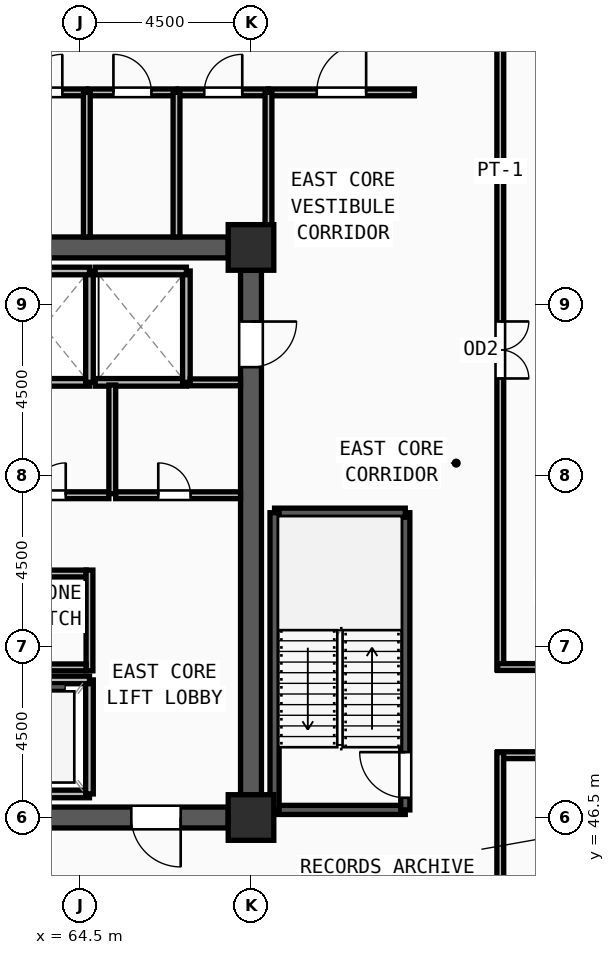
"""IFC4 building model, lengths in metres.
Left out: names, types, materials, properties, quantities, classifications, styles, units other than length and angle.
Written with IfcOpenShell. Run it as: python <this file> out.ifc"""

import sys

from ifc_helpers import new_model, si_unit, direction, frame, frame_2d, origin, origin_2d, place, context, subcontext, project, spatial, rectangle, extrude, source, transform, mapped, element, fill, save


model = new_model("IFC4")
c1 = context("Model", 3, precision=1e-05, world=origin(), true_north=direction((0.0, 1.0)))
c2 = subcontext(c1, "Body", "Model", "MODEL_VIEW")
j1 = project(units=[si_unit("LENGTHUNIT", "METRE"), si_unit("PLANEANGLEUNIT", "RADIAN")], contexts=[c1])
p1 = place(None, origin())
s1 = spatial("IfcSite", under=j1, at=p1, CompositionType="ELEMENT")
p2 = place(p1, origin())
s2 = spatial("IfcBuilding", under=s1, at=p2, CompositionType="ELEMENT")
p3 = place(p2, frame((0.0, 0.0, 328.5)))
s3 = spatial("IfcBuildingStorey", under=s2, at=p3, CompositionType="ELEMENT", Elevation=328.5)
m1 = source(origin(), c2, "Body", "SweptSolid", [
    extrude(rectangle(XDim=1.2, YDim=1.2, at=origin_2d()), origin(), (0.0, 0.0, 1.0), 3.75),
])
for number, where, z_axis, x_axis in (
    (1, (69.0, 46.5, 0.0), (0.0, 0.0, 1.0), (1.0, 0.0, 0.0)),
    (2, (69.0, 61.5, 0.0), (0.0, 0.0, 1.0), (1.0, 0.0, 0.0)),
):
    element("IfcColumn", number, at=place(p3, frame(where, z_axis=z_axis, x_axis=x_axis)), inside=s3, PredefinedType="COLUMN", context=c2, shape_type="MappedRepresentation", body=[
        mapped(m1, transform((0.0, 0.0, 0.0), x_axis=(1.0, 0.0, 0.0), y_axis=(0.0, 1.0, 0.0), z_axis=(0.0, 0.0, 1.0), scale=1.0)),
    ])
p4 = place(p3, frame((60.6, 61.5, 0.0), z_axis=(0.0, 0.0, 1.0), x_axis=(1.0, 0.0, 0.0)))
e3 = element("IfcWall", 3, at=p4, inside=s3, PredefinedType="SHEAR", context=c2, shape_type="SweptSolid", body=[
    extrude(rectangle(XDim=7.8, YDim=0.55, at=frame_2d((3.9, 0.0))), origin(), (0.0, 0.0, 1.0), 3.57),
])
p5 = place(p3, frame((69.0, 60.9, 0.0), z_axis=(0.0, 0.0, 1.0), x_axis=(0.0, -1.0, 0.0)))
e4 = element("IfcWall", 4, at=p5, inside=s3, PredefinedType="SHEAR", context=c2, shape_type="SweptSolid", body=[
    extrude(rectangle(XDim=13.8, YDim=0.55, at=frame_2d((6.9, 0.0))), origin(), (0.0, 0.0, 1.0), 3.57),
])
m2 = source(origin(), c2, "Body", "SweptSolid", [
    extrude(rectangle(XDim=1.2, YDim=2.2, at=frame_2d((0.6, 1.1))), frame((0.0, 0.285, 0.0), z_axis=(0.0, -1.0, 0.0), x_axis=(1.0, 0.0, 0.0)), (0.0, 0.0, 1.0), 0.57),
])
p6 = place(p5, frame((1.35, 0.0, 0.0)))
e5 = element("IfcOpeningElement", 5, at=p6, cuts=e4, PredefinedType="OPENING", context=c2, shape_type="MappedRepresentation", body=[
    mapped(m2, transform((0.0, 0.0, 0.0), x_axis=(1.0, 0.0, 0.0), y_axis=(0.0, 1.0, 0.0), z_axis=(0.0, 0.0, 1.0), scale=1.0)),
])
p7 = place(p3, frame((68.4, 46.5, 0.0), z_axis=(0.0, 0.0, 1.0), x_axis=(-1.0, 0.0, 0.0)))
e6 = element("IfcWall", 6, at=p7, inside=s3, PredefinedType="SHEAR", context=c2, shape_type="SweptSolid", body=[
    extrude(rectangle(XDim=7.8, YDim=0.55, at=frame_2d((3.9, 0.0))), origin(), (0.0, 0.0, 1.0), 3.57),
])
m3 = source(origin(), c2, "Body", "SweptSolid", [
    extrude(rectangle(XDim=1.3, YDim=2.2, at=frame_2d((0.65, 1.1))), frame((0.0, 0.285, 0.0), z_axis=(0.0, -1.0, 0.0), x_axis=(1.0, 0.0, 0.0)), (0.0, 0.0, 1.0), 0.57),
])
p8 = place(p7, frame((1.25, 0.0, 0.0)))
e7 = element("IfcOpeningElement", 7, at=p8, cuts=e6, PredefinedType="OPENING", context=c2, shape_type="MappedRepresentation", body=[
    mapped(m3, transform((0.0, 0.0, 0.0), x_axis=(1.0, 0.0, 0.0), y_axis=(0.0, 1.0, 0.0), z_axis=(0.0, 0.0, 1.0), scale=1.0)),
])
p9 = place(p3, frame((69.62, 46.7, 0.0), z_axis=(0.0, 0.0, 1.0), x_axis=(1.0, 0.0, 0.0)))
e8 = element("IfcWall", 8, at=p9, inside=s3, PredefinedType="SOLIDWALL", context=c2, shape_type="SweptSolid", body=[
    extrude(rectangle(XDim=3.44, YDim=0.24, at=frame_2d((1.72, 0.0))), origin(), (0.0, 0.0, 1.0), 3.57),
])
p10 = place(p3, frame((73.06, 46.7, 0.0), z_axis=(0.0, 0.0, 1.0), x_axis=(0.0, 1.0, 0.0)))
e9 = element("IfcWall", 9, at=p10, inside=s3, PredefinedType="SOLIDWALL", context=c2, shape_type="SweptSolid", body=[
    extrude(rectangle(XDim=7.82, YDim=0.24, at=frame_2d((3.91, 0.0))), origin(), (0.0, 0.0, 1.0), 3.57),
])
m4 = source(origin(), c2, "Body", "SweptSolid", [
    extrude(rectangle(XDim=1.2, YDim=2.2, at=frame_2d((0.6, 1.1))), frame((0.0, 0.13, 0.0), z_axis=(0.0, -1.0, 0.0), x_axis=(1.0, 0.0, 0.0)), (0.0, 0.0, 1.0), 0.26),
])
p11 = place(p10, frame((0.32, 0.0, 0.0)))
e10 = element("IfcOpeningElement", 10, at=p11, cuts=e9, PredefinedType="OPENING", context=c2, shape_type="MappedRepresentation", body=[
    mapped(m4, transform((0.0, 0.0, 0.0), x_axis=(1.0, 0.0, 0.0), y_axis=(0.0, 1.0, 0.0), z_axis=(0.0, 0.0, 1.0), scale=1.0)),
])
p12 = place(p3, frame((73.06, 54.52, 0.0), z_axis=(0.0, 0.0, 1.0), x_axis=(-1.0, 0.0, 0.0)))
e11 = element("IfcWall", 11, at=p12, inside=s3, PredefinedType="SOLIDWALL", context=c2, shape_type="SweptSolid", body=[
    extrude(rectangle(XDim=3.44, YDim=0.24, at=frame_2d((1.72, 0.0))), origin(), (0.0, 0.0, 1.0), 3.57),
])
p13 = place(p3, frame((69.62, 54.52, 0.0), z_axis=(0.0, 0.0, 1.0), x_axis=(0.0, -1.0, 0.0)))
e12 = element("IfcWall", 12, at=p13, inside=s3, PredefinedType="SOLIDWALL", context=c2, shape_type="SweptSolid", body=[
    extrude(rectangle(XDim=7.82, YDim=0.24, at=frame_2d((3.91, 0.0))), origin(), (0.0, 0.0, 1.0), 3.57),
])
p14 = place(p3, frame((62.35, 47.12, 0.0), z_axis=(0.0, 0.0, 1.0), x_axis=(1.0, 0.0, 0.0)))
e13 = element("IfcWall", 13, at=p14, inside=s3, PredefinedType="SOLIDWALL", context=c2, shape_type="SweptSolid", body=[
    extrude(rectangle(XDim=2.4, YDim=0.2, at=frame_2d((1.2, 0.0))), origin(), (0.0, 0.0, 1.0), 3.57),
])
p15 = place(p3, frame((64.75, 47.12, 0.0), z_axis=(0.0, 0.0, 1.0), x_axis=(0.0, 1.0, 0.0)))
e14 = element("IfcWall", 14, at=p15, inside=s3, PredefinedType="SOLIDWALL", context=c2, shape_type="SweptSolid", body=[
    extrude(rectangle(XDim=3.0, YDim=0.2, at=frame_2d((1.5, 0.0))), origin(), (0.0, 0.0, 1.0), 3.57),
])
for number, where, z_axis, x_axis in (
    (15, (64.75, 50.12, 0.0), (0.0, 0.0, 1.0), (-1.0, 0.0, 0.0)),
    (16, (62.35, 57.95, 0.0), (0.0, 0.0, 1.0), (1.0, 0.0, 0.0)),
):
    element("IfcWall", number, at=place(p3, frame(where, z_axis=z_axis, x_axis=x_axis)), inside=s3, PredefinedType="SOLIDWALL", context=c2, shape_type="SweptSolid", body=[
        extrude(rectangle(XDim=2.4, YDim=0.2, at=frame_2d((1.2, 0.0))), origin(), (0.0, 0.0, 1.0), 3.57),
    ])
p16 = place(p3, frame((64.75, 57.95, 0.0), z_axis=(0.0, 0.0, 1.0), x_axis=(0.0, 1.0, 0.0)))
e17 = element("IfcWall", 17, at=p16, inside=s3, PredefinedType="SOLIDWALL", context=c2, shape_type="SweptSolid", body=[
    extrude(rectangle(XDim=2.93, YDim=0.2, at=frame_2d((1.465, 0.0))), origin(), (0.0, 0.0, 1.0), 3.57),
])
p17 = place(p3, frame((64.75, 60.88, 0.0), z_axis=(0.0, 0.0, 1.0), x_axis=(-1.0, 0.0, 0.0)))
e18 = element("IfcWall", 18, at=p17, inside=s3, PredefinedType="SOLIDWALL", context=c2, shape_type="SweptSolid", body=[
    extrude(rectangle(XDim=2.4, YDim=0.2, at=frame_2d((1.2, 0.0))), origin(), (0.0, 0.0, 1.0), 3.57),
])
p18 = place(p3, frame((64.9, 57.95, 0.0), z_axis=(0.0, 0.0, 1.0), x_axis=(1.0, 0.0, 0.0)))
e19 = element("IfcWall", 19, at=p18, inside=s3, PredefinedType="SOLIDWALL", context=c2, shape_type="SweptSolid", body=[
    extrude(rectangle(XDim=2.4, YDim=0.2, at=frame_2d((1.2, 0.0))), origin(), (0.0, 0.0, 1.0), 3.57),
])
p19 = place(p3, frame((67.3, 57.95, 0.0), z_axis=(0.0, 0.0, 1.0), x_axis=(0.0, 1.0, 0.0)))
e20 = element("IfcWall", 20, at=p19, inside=s3, PredefinedType="SOLIDWALL", context=c2, shape_type="SweptSolid", body=[
    extrude(rectangle(XDim=2.93, YDim=0.2, at=frame_2d((1.465, 0.0))), origin(), (0.0, 0.0, 1.0), 3.57),
])
p20 = place(p3, frame((67.3, 60.88, 0.0), z_axis=(0.0, 0.0, 1.0), x_axis=(-1.0, 0.0, 0.0)))
e21 = element("IfcWall", 21, at=p20, inside=s3, PredefinedType="SOLIDWALL", context=c2, shape_type="SweptSolid", body=[
    extrude(rectangle(XDim=2.4, YDim=0.2, at=frame_2d((1.2, 0.0))), origin(), (0.0, 0.0, 1.0), 3.57),
])
p21 = place(p3, frame((60.0, 52.92, 0.0), z_axis=(0.0, 0.0, 1.0), x_axis=(1.0, 0.0, 0.0)))
e22 = element("IfcWall", 22, at=p21, inside=s3, PredefinedType="PARTITIONING", context=c2, shape_type="SweptSolid", body=[
    extrude(rectangle(XDim=4.66, YDim=0.18, at=frame_2d((2.33, 0.0))), origin(), (0.0, 0.0, 1.0), 3.57),
])
m5 = source(origin(), c2, "Body", "SweptSolid", [
    extrude(rectangle(XDim=0.85, YDim=2.1, at=frame_2d((0.425, 1.05))), frame((0.0, 0.1, 0.0), z_axis=(0.0, -1.0, 0.0), x_axis=(1.0, 0.0, 0.0)), (0.0, 0.0, 1.0), 0.2),
])
p22 = place(p21, frame((1.975, 0.0, 0.0)))
e23 = element("IfcOpeningElement", 23, at=p22, cuts=e22, PredefinedType="OPENING", context=c2, shape_type="MappedRepresentation", body=[
    mapped(m5, transform((0.0, 0.0, 0.0), x_axis=(1.0, 0.0, 0.0), y_axis=(0.0, 1.0, 0.0), z_axis=(0.0, 0.0, 1.0), scale=1.0)),
])
p23 = place(p3, frame((62.1, 54.98, 0.0), z_axis=(0.0, 0.0, 1.0), x_axis=(1.0, 0.0, 0.0)))
e24 = element("IfcWall", 24, at=p23, inside=s3, PredefinedType="PARTITIONING", context=c2, shape_type="SweptSolid", body=[
    extrude(rectangle(XDim=3.16, YDim=0.18, at=frame_2d((1.58, 0.0))), origin(), (0.0, 0.0, 1.0), 3.57),
])
p24 = place(p23, frame((1.175, 0.0, 0.0)))
e25 = element("IfcOpeningElement", 25, at=p24, cuts=e24, PredefinedType="OPENING", context=c2, shape_type="MappedRepresentation", body=[
    mapped(m5, transform((0.0, 0.0, 0.0), x_axis=(1.0, 0.0, 0.0), y_axis=(0.0, 1.0, 0.0), z_axis=(0.0, 0.0, 1.0), scale=1.0)),
])
p25 = place(p3, frame((65.44, 54.98, 0.0), z_axis=(0.0, 0.0, 1.0), x_axis=(1.0, 0.0, 0.0)))
e26 = element("IfcWall", 26, at=p25, inside=s3, PredefinedType="PARTITIONING", context=c2, shape_type="SweptSolid", body=[
    extrude(rectangle(XDim=3.285, YDim=0.18, at=frame_2d((1.643, 0.0))), origin(), (0.0, 0.0, 1.0), 3.57),
])
p26 = place(p25, frame((1.12, 0.0, 0.0)))
e27 = element("IfcOpeningElement", 27, at=p26, cuts=e26, PredefinedType="OPENING", context=c2, shape_type="MappedRepresentation", body=[
    mapped(m5, transform((0.0, 0.0, 0.0), x_axis=(1.0, 0.0, 0.0), y_axis=(0.0, 1.0, 0.0), z_axis=(0.0, 0.0, 1.0), scale=1.0)),
])
p27 = place(p3, frame((62.39, 65.58, 0.0), z_axis=(0.0, 0.0, 1.0), x_axis=(1.0, 0.0, 0.0)))
e28 = element("IfcWall", 28, at=p27, inside=s3, PredefinedType="PARTITIONING", context=c2, shape_type="SweptSolid", body=[
    extrude(rectangle(XDim=2.29, YDim=0.18, at=frame_2d((1.145, 0.0))), origin(), (0.0, 0.0, 1.0), 3.57),
])
m6 = source(origin(), c2, "Body", "SweptSolid", [
    extrude(rectangle(XDim=1.0, YDim=2.2, at=frame_2d((0.5, 1.1))), frame((0.0, 0.1, 0.0), z_axis=(0.0, -1.0, 0.0), x_axis=(1.0, 0.0, 0.0)), (0.0, 0.0, 1.0), 0.2),
])
p28 = place(p27, frame((0.645, 0.0, 0.0)))
e29 = element("IfcOpeningElement", 29, at=p28, cuts=e28, PredefinedType="OPENING", context=c2, shape_type="MappedRepresentation", body=[
    mapped(m6, transform((0.0, 0.0, 0.0), x_axis=(1.0, 0.0, 0.0), y_axis=(0.0, 1.0, 0.0), z_axis=(0.0, 0.0, 1.0), scale=1.0)),
])
p29 = place(p3, frame((64.72, 65.58, 0.0), z_axis=(0.0, 0.0, 1.0), x_axis=(1.0, 0.0, 0.0)))
e30 = element("IfcWall", 30, at=p29, inside=s3, PredefinedType="PARTITIONING", context=c2, shape_type="SweptSolid", body=[
    extrude(rectangle(XDim=2.32, YDim=0.18, at=frame_2d((1.16, 0.0))), origin(), (0.0, 0.0, 1.0), 3.57),
])
p30 = place(p29, frame((0.66, 0.0, 0.0)))
e31 = element("IfcOpeningElement", 31, at=p30, cuts=e30, PredefinedType="OPENING", context=c2, shape_type="MappedRepresentation", body=[
    mapped(m6, transform((0.0, 0.0, 0.0), x_axis=(1.0, 0.0, 0.0), y_axis=(0.0, 1.0, 0.0), z_axis=(0.0, 0.0, 1.0), scale=1.0)),
])
p31 = place(p3, frame((67.08, 65.58, 0.0), z_axis=(0.0, 0.0, 1.0), x_axis=(1.0, 0.0, 0.0)))
e32 = element("IfcWall", 32, at=p31, inside=s3, PredefinedType="PARTITIONING", context=c2, shape_type="SweptSolid", body=[
    extrude(rectangle(XDim=2.38, YDim=0.18, at=frame_2d((1.19, 0.0))), origin(), (0.0, 0.0, 1.0), 3.57),
])
p32 = place(p31, frame((0.69, 0.0, 0.0)))
e33 = element("IfcOpeningElement", 33, at=p32, cuts=e32, PredefinedType="OPENING", context=c2, shape_type="MappedRepresentation", body=[
    mapped(m6, transform((0.0, 0.0, 0.0), x_axis=(1.0, 0.0, 0.0), y_axis=(0.0, 1.0, 0.0), z_axis=(0.0, 0.0, 1.0), scale=1.0)),
])
p33 = place(p3, frame((69.46, 65.58, 0.0), z_axis=(0.0, 0.0, 1.0), x_axis=(1.0, 0.0, 0.0)))
e34 = element("IfcWall", 34, at=p33, inside=s3, PredefinedType="PARTITIONING", context=c2, shape_type="SweptSolid", body=[
    extrude(rectangle(XDim=3.84, YDim=0.18, at=frame_2d((1.92, 0.0))), origin(), (0.0, 0.0, 1.0), 3.57),
])
m7 = source(origin(), c2, "Body", "SweptSolid", [
    extrude(rectangle(XDim=1.3, YDim=2.2, at=frame_2d((0.65, 1.1))), frame((0.0, 0.1, 0.0), z_axis=(0.0, -1.0, 0.0), x_axis=(1.0, 0.0, 0.0)), (0.0, 0.0, 1.0), 0.2),
])
p34 = place(p33, frame((1.27, 0.0, 0.0)))
e35 = element("IfcOpeningElement", 35, at=p34, cuts=e34, PredefinedType="OPENING", context=c2, shape_type="MappedRepresentation", body=[
    mapped(m7, transform((0.0, 0.0, 0.0), x_axis=(1.0, 0.0, 0.0), y_axis=(0.0, 1.0, 0.0), z_axis=(0.0, 0.0, 1.0), scale=1.0)),
])
p35 = place(p3, frame((75.56, 67.215, 0.0), z_axis=(0.0, 0.0, 1.0), x_axis=(0.0, -1.0, 0.0)))
e36 = element("IfcWall", 36, at=p35, inside=s3, PredefinedType="PARTITIONING", context=c2, shape_type="SweptSolid", body=[
    extrude(rectangle(XDim=16.825, YDim=0.18, at=frame_2d((8.413, 0.0))), origin(), (0.0, 0.0, 1.0), 3.57),
])
m8 = source(origin(), c2, "Body", "SweptSolid", [
    extrude(rectangle(XDim=1.5, YDim=2.2, at=frame_2d((0.75, 1.1))), frame((0.0, 0.1, 0.0), z_axis=(0.0, -1.0, 0.0), x_axis=(1.0, 0.0, 0.0)), (0.0, 0.0, 1.0), 0.2),
])
p36 = place(p35, frame((7.663, 0.0, 0.0)))
e37 = element("IfcOpeningElement", 37, at=p36, cuts=e36, PredefinedType="OPENING", context=c2, shape_type="MappedRepresentation", body=[
    mapped(m8, transform((0.0, 0.0, 0.0), x_axis=(1.0, 0.0, 0.0), y_axis=(0.0, 1.0, 0.0), z_axis=(0.0, 0.0, 1.0), scale=1.0)),
])
p37 = place(p3, frame((81.416, 48.14, 0.0), z_axis=(0.0, 0.0, 1.0), x_axis=(-1.0, 0.0, 0.0)))
e38 = element("IfcWall", 38, at=p37, inside=s3, PredefinedType="PARTITIONING", context=c2, shape_type="SweptSolid", body=[
    extrude(rectangle(XDim=5.926, YDim=0.18, at=frame_2d((2.963, 0.0))), origin(), (0.0, 0.0, 1.0), 3.57),
])
p38 = place(p37, frame((2.463, 0.0, 0.0)))
e39 = element("IfcOpeningElement", 39, at=p38, cuts=e38, PredefinedType="OPENING", context=c2, shape_type="MappedRepresentation", body=[
    mapped(m6, transform((0.0, 0.0, 0.0), x_axis=(1.0, 0.0, 0.0), y_axis=(0.0, 1.0, 0.0), z_axis=(0.0, 0.0, 1.0), scale=1.0)),
])
p39 = place(p3, frame((65.35, 55.02, 0.0), z_axis=(0.0, 0.0, 1.0), x_axis=(0.0, 1.0, 0.0)))
e40 = element("IfcWall", 40, at=p39, inside=s3, PredefinedType="PARTITIONING", context=c2, shape_type="SweptSolid", body=[
    extrude(rectangle(XDim=2.86, YDim=0.18, at=frame_2d((1.43, 0.0))), origin(), (0.0, 0.0, 1.0), 3.57),
])
for number, where, z_axis, x_axis in (
    (41, (64.68, 61.775, 0.0), (0.0, 0.0, 1.0), (0.0, 1.0, 0.0)),
    (42, (67.04, 61.775, 0.0), (0.0, 0.0, 1.0), (0.0, 1.0, 0.0)),
):
    element("IfcWall", number, at=place(p3, frame(where, z_axis=z_axis, x_axis=x_axis)), inside=s3, PredefinedType="PARTITIONING", context=c2, shape_type="SweptSolid", body=[
        extrude(rectangle(XDim=3.805, YDim=0.18, at=frame_2d((1.903, 0.0))), origin(), (0.0, 0.0, 1.0), 3.57),
    ])
p40 = place(p3, frame((69.46, 61.95, 0.0), z_axis=(0.0, 0.0, 1.0), x_axis=(0.0, 1.0, 0.0)))
e43 = element("IfcWall", 43, at=p40, inside=s3, PredefinedType="PARTITIONING", context=c2, shape_type="SweptSolid", body=[
    extrude(rectangle(XDim=3.63, YDim=0.18, at=frame_2d((1.815, 0.0))), origin(), (0.0, 0.0, 1.0), 3.57),
])
p41 = place(p3, frame((75.49, 50.46, 0.0), z_axis=(0.0, 0.0, 1.0), x_axis=(1.0, 0.0, 0.0)))
e44 = element("IfcWall", 44, at=p41, inside=s3, PredefinedType="PARTITIONING", context=c2, shape_type="SweptSolid", body=[
    extrude(rectangle(XDim=7.061, YDim=0.18, at=frame_2d((3.531, 0.0))), origin(), (0.0, 0.0, 1.0), 3.57),
])
p42 = place(p3, frame((75.56, 48.21, 0.0), z_axis=(0.0, 0.0, 1.0), x_axis=(0.0, -1.0, 0.0)))
e45 = element("IfcWall", 45, at=p42, inside=s3, PredefinedType="PARTITIONING", context=c2, shape_type="SweptSolid", body=[
    extrude(rectangle(XDim=3.395, YDim=0.18, at=frame_2d((1.698, 0.0))), origin(), (0.0, 0.0, 1.0), 3.57),
])
p43 = place(p3, frame((64.75, 50.36, 0.0), z_axis=(0.0, 0.0, 1.0), x_axis=(0.0, 1.0, 0.0)))
e46 = element("IfcWall", 46, at=p43, inside=s3, PredefinedType="PARTITIONING", context=c2, shape_type="SweptSolid", body=[
    extrude(rectangle(XDim=2.65, YDim=0.18, at=frame_2d((1.325, 0.0))), origin(), (0.0, 0.0, 1.0), 3.57),
])
p44 = place(p3, frame((60.0, 50.45, 0.0), z_axis=(0.0, 0.0, 1.0), x_axis=(1.0, 0.0, 0.0)))
e47 = element("IfcWall", 47, at=p44, inside=s3, PredefinedType="PARTITIONING", context=c2, shape_type="SweptSolid", body=[
    extrude(rectangle(XDim=4.66, YDim=0.18, at=frame_2d((2.33, 0.0))), origin(), (0.0, 0.0, 1.0), 3.57),
])
p45 = place(p3, frame((67.4, 57.95, 0.0), z_axis=(0.0, 0.0, 1.0), x_axis=(1.0, 0.0, 0.0)))
e48 = element("IfcWall", 48, at=p45, inside=s3, PredefinedType="PARTITIONING", context=c2, shape_type="SweptSolid", body=[
    extrude(rectangle(XDim=1.325, YDim=0.18, at=frame_2d((0.663, 0.0))), origin(), (0.0, 0.0, 1.0), 3.57),
])
m9 = source(origin(), c2, "Body", "SweptSolid", [
    extrude(rectangle(XDim=1.3, YDim=2.2, at=frame_2d((0.65, 1.1))), frame((0.0, 0.025, 0.0), z_axis=(0.0, -1.0, 0.0), x_axis=(1.0, 0.0, 0.0)), (0.0, 0.0, 1.0), 0.05),
])
p46 = place(p8, origin())
e49 = element("IfcDoor", 49, at=p46, inside=s3, OperationType="SINGLE_SWING_LEFT", PredefinedType="DOOR", context=c2, shape_type="MappedRepresentation", body=[
    mapped(m9, transform((0.0, 0.0, 0.0), x_axis=(1.0, 0.0, 0.0), y_axis=(0.0, 1.0, 0.0), z_axis=(0.0, 0.0, 1.0), scale=1.0)),
])
fill(e7, e49)
m10 = source(origin(), c2, "Body", "SweptSolid", [
    extrude(rectangle(XDim=1.2, YDim=2.2, at=frame_2d((0.6, 1.1))), frame((0.0, 0.025, 0.0), z_axis=(0.0, -1.0, 0.0), x_axis=(1.0, 0.0, 0.0)), (0.0, 0.0, 1.0), 0.05),
])
p47 = place(p6, origin())
e50 = element("IfcDoor", 50, at=p47, inside=s3, OperationType="SINGLE_SWING_LEFT", PredefinedType="DOOR", context=c2, shape_type="MappedRepresentation", body=[
    mapped(m10, transform((0.0, 0.0, 0.0), x_axis=(1.0, 0.0, 0.0), y_axis=(0.0, 1.0, 0.0), z_axis=(0.0, 0.0, 1.0), scale=1.0)),
])
fill(e5, e50)
p48 = place(p11, origin())
e51 = element("IfcDoor", 51, at=p48, inside=s3, OperationType="SINGLE_SWING_RIGHT", PredefinedType="DOOR", context=c2, shape_type="MappedRepresentation", body=[
    mapped(m10, transform((0.0, 0.0, 0.0), x_axis=(1.0, 0.0, 0.0), y_axis=(0.0, 1.0, 0.0), z_axis=(0.0, 0.0, 1.0), scale=1.0)),
])
fill(e10, e51)
m11 = source(origin(), c2, "Body", "SweptSolid", [
    extrude(rectangle(XDim=0.85, YDim=2.1, at=frame_2d((0.425, 1.05))), frame((0.0, 0.025, 0.0), z_axis=(0.0, -1.0, 0.0), x_axis=(1.0, 0.0, 0.0)), (0.0, 0.0, 1.0), 0.05),
])
p49 = place(p24, origin())
e52 = element("IfcDoor", 52, at=p49, inside=s3, OperationType="SINGLE_SWING_RIGHT", PredefinedType="DOOR", context=c2, shape_type="MappedRepresentation", body=[
    mapped(m11, transform((0.0, 0.0, 0.0), x_axis=(1.0, 0.0, 0.0), y_axis=(0.0, 1.0, 0.0), z_axis=(0.0, 0.0, 1.0), scale=1.0)),
])
fill(e25, e52)
p50 = place(p26, origin())
e53 = element("IfcDoor", 53, at=p50, inside=s3, OperationType="SINGLE_SWING_LEFT", PredefinedType="DOOR", context=c2, shape_type="MappedRepresentation", body=[
    mapped(m11, transform((0.0, 0.0, 0.0), x_axis=(1.0, 0.0, 0.0), y_axis=(0.0, 1.0, 0.0), z_axis=(0.0, 0.0, 1.0), scale=1.0)),
])
fill(e27, e53)
m12 = source(origin(), c2, "Body", "SweptSolid", [
    extrude(rectangle(XDim=1.0, YDim=2.2, at=frame_2d((0.5, 1.1))), frame((0.0, 0.025, 0.0), z_axis=(0.0, -1.0, 0.0), x_axis=(1.0, 0.0, 0.0)), (0.0, 0.0, 1.0), 0.05),
])
p51 = place(p28, origin())
e54 = element("IfcDoor", 54, at=p51, inside=s3, OperationType="SINGLE_SWING_RIGHT", PredefinedType="DOOR", context=c2, shape_type="MappedRepresentation", body=[
    mapped(m12, transform((0.0, 0.0, 0.0), x_axis=(1.0, 0.0, 0.0), y_axis=(0.0, 1.0, 0.0), z_axis=(0.0, 0.0, 1.0), scale=1.0)),
])
fill(e29, e54)
p52 = place(p30, origin())
e55 = element("IfcDoor", 55, at=p52, inside=s3, OperationType="SINGLE_SWING_LEFT", PredefinedType="DOOR", context=c2, shape_type="MappedRepresentation", body=[
    mapped(m12, transform((0.0, 0.0, 0.0), x_axis=(1.0, 0.0, 0.0), y_axis=(0.0, 1.0, 0.0), z_axis=(0.0, 0.0, 1.0), scale=1.0)),
])
fill(e31, e55)
p53 = place(p32, origin())
e56 = element("IfcDoor", 56, at=p53, inside=s3, OperationType="SINGLE_SWING_RIGHT", PredefinedType="DOOR", context=c2, shape_type="MappedRepresentation", body=[
    mapped(m12, transform((0.0, 0.0, 0.0), x_axis=(1.0, 0.0, 0.0), y_axis=(0.0, 1.0, 0.0), z_axis=(0.0, 0.0, 1.0), scale=1.0)),
])
fill(e33, e56)
p54 = place(p34, origin())
e57 = element("IfcDoor", 57, at=p54, inside=s3, OperationType="SINGLE_SWING_RIGHT", PredefinedType="DOOR", context=c2, shape_type="MappedRepresentation", body=[
    mapped(m9, transform((0.0, 0.0, 0.0), x_axis=(1.0, 0.0, 0.0), y_axis=(0.0, 1.0, 0.0), z_axis=(0.0, 0.0, 1.0), scale=1.0)),
])
fill(e35, e57)
m13 = source(origin(), c2, "Body", "SweptSolid", [
    extrude(rectangle(XDim=1.5, YDim=2.2, at=frame_2d((0.75, 1.1))), frame((0.0, 0.025, 0.0), z_axis=(0.0, -1.0, 0.0), x_axis=(1.0, 0.0, 0.0)), (0.0, 0.0, 1.0), 0.05),
])
p55 = place(p36, origin())
e58 = element("IfcDoor", 58, at=p55, inside=s3, OperationType="DOUBLE_DOOR_SINGLE_SWING", PredefinedType="DOOR", context=c2, shape_type="MappedRepresentation", body=[
    mapped(m13, transform((0.0, 0.0, 0.0), x_axis=(1.0, 0.0, 0.0), y_axis=(0.0, 1.0, 0.0), z_axis=(0.0, 0.0, 1.0), scale=1.0)),
])
fill(e37, e58)
save(model, sys.argv[1])
